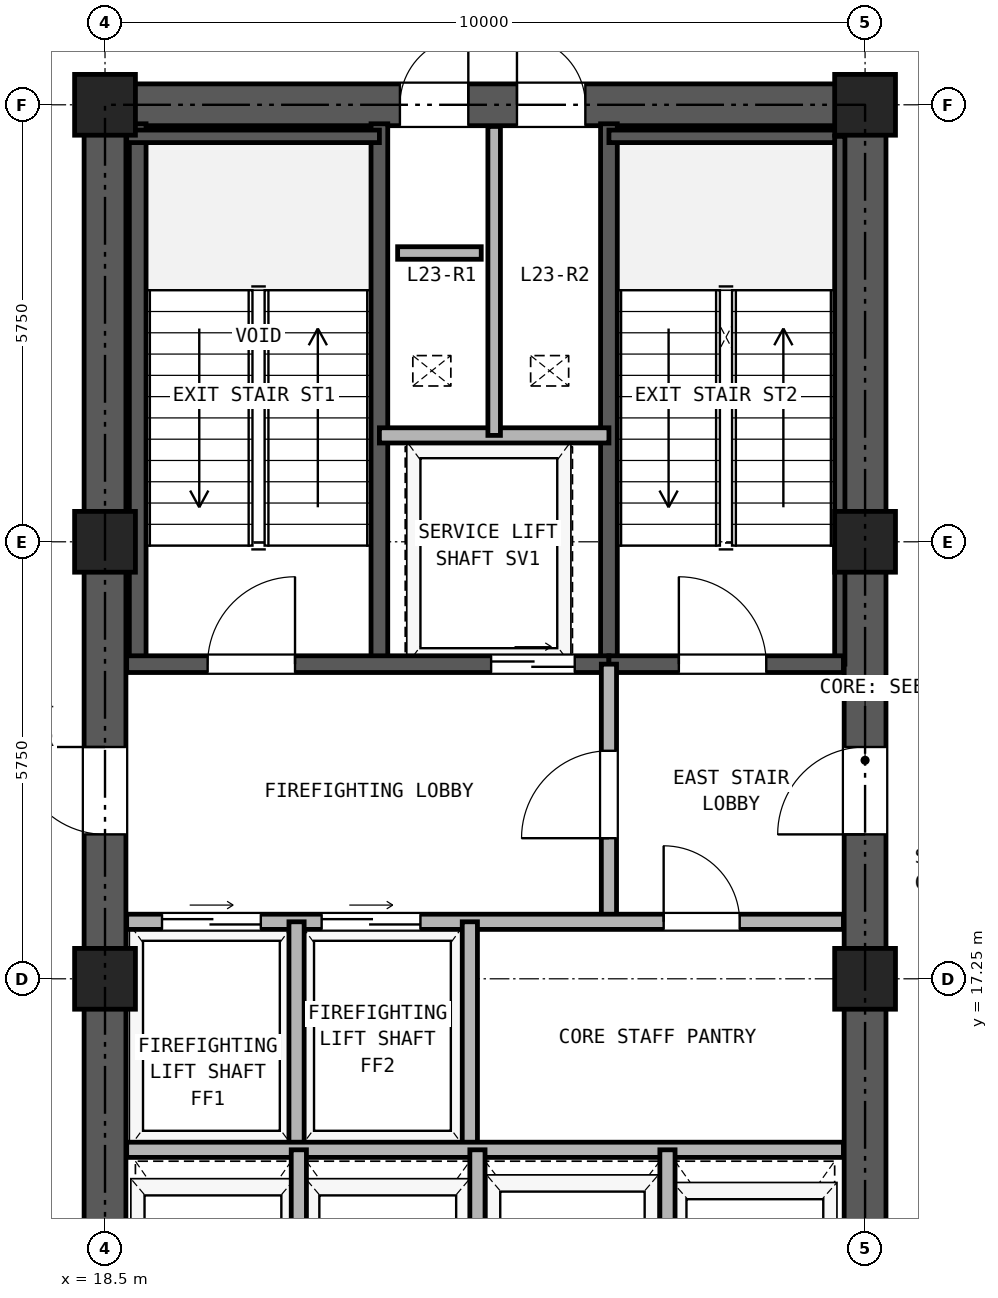
"""IFC4 building model, lengths in metres.
Left out: names, types, materials, properties, quantities, classifications, styles, units other than length and angle.
Written with IfcOpenShell. Run it as: python <this file> out.ifc"""

import sys

from ifc_helpers import new_model, si_unit, direction, frame, frame_2d, origin, origin_2d, place, context, subcontext, project, spatial, rectangle, hollow_rectangle, extrude, source, transform, mapped, element, fill, save


model = new_model("IFC4")
c1 = context("Model", 3, precision=1e-05, world=origin(), true_north=direction((0.0, 1.0)))
c2 = subcontext(c1, "Body", "Model", "MODEL_VIEW")
j1 = project(units=[si_unit("LENGTHUNIT", "METRE"), si_unit("PLANEANGLEUNIT", "RADIAN")], contexts=[c1])
p1 = place(None, origin())
s1 = spatial("IfcSite", under=j1, at=p1, CompositionType="ELEMENT")
p2 = place(p1, origin())
s2 = spatial("IfcBuilding", under=s1, at=p2, CompositionType="ELEMENT")
p3 = place(p2, frame((0.0, 0.0, 88.2)))
s3 = spatial("IfcBuildingStorey", under=s2, at=p3, CompositionType="ELEMENT", Elevation=88.2)
m1 = source(origin(), c2, "Body", "SweptSolid", [
    extrude(hollow_rectangle(XDim=0.8, YDim=0.8, WallThickness=0.045, at=origin_2d()), origin(), (0.0, 0.0, 1.0), 4.25),
])
for number, where, z_axis, x_axis in (
    (1, (18.5, 17.25, 0.0), (0.0, 0.0, 1.0), (1.0, 0.0, 0.0)),
    (2, (18.5, 23.0, 0.0), (0.0, 0.0, 1.0), (1.0, 0.0, 0.0)),
    (3, (18.5, 28.75, 0.0), (0.0, 0.0, 1.0), (1.0, 0.0, 0.0)),
    (4, (28.5, 17.25, 0.0), (0.0, 0.0, 1.0), (1.0, 0.0, 0.0)),
    (5, (28.5, 23.0, 0.0), (0.0, 0.0, 1.0), (1.0, 0.0, 0.0)),
    (6, (28.5, 28.75, 0.0), (0.0, 0.0, 1.0), (1.0, 0.0, 0.0)),
):
    element("IfcColumn", number, at=place(p3, frame(where, z_axis=z_axis, x_axis=x_axis)), inside=s3, PredefinedType="COLUMN", context=c2, shape_type="MappedRepresentation", body=[
        mapped(m1, transform((0.0, 0.0, 0.0), x_axis=(1.0, 0.0, 0.0), y_axis=(0.0, 1.0, 0.0), z_axis=(0.0, 0.0, 1.0), scale=1.0)),
    ])
p4 = place(p3, frame((18.225, 28.75, 0.0), z_axis=(0.0, 0.0, 1.0), x_axis=(1.0, 0.0, 0.0)))
e7 = element("IfcWall", 7, at=p4, inside=s3, PredefinedType="SHEAR", context=c2, shape_type="SweptSolid", body=[
    extrude(rectangle(XDim=10.55, YDim=0.55, at=frame_2d((5.275, 0.0))), origin(), (0.0, 0.0, 1.0), 4.25),
])
p5 = place(p4, frame((4.155, 0.0, 0.0)))
e8 = element("IfcOpeningElement", 8, at=p5, cuts=e7, PredefinedType="OPENING", context=c2, shape_type="SweptSolid", body=[
    extrude(rectangle(XDim=0.9, YDim=2.05, at=frame_2d((0.45, 1.025))), frame((0.0, 0.285, 0.0), z_axis=(0.0, -1.0, 0.0), x_axis=(1.0, 0.0, 0.0)), (0.0, 0.0, 1.0), 0.57),
])
p6 = place(p4, frame((5.695, 0.0, 0.0)))
e9 = element("IfcOpeningElement", 9, at=p6, cuts=e7, PredefinedType="OPENING", context=c2, shape_type="SweptSolid", body=[
    extrude(rectangle(XDim=0.9, YDim=2.05, at=frame_2d((0.45, 1.025))), frame((0.0, 0.285, 0.0), z_axis=(0.0, -1.0, 0.0), x_axis=(1.0, 0.0, 0.0)), (0.0, 0.0, 1.0), 0.57),
])
p7 = place(p3, frame((18.5, 11.775, 0.0), z_axis=(0.0, 0.0, 1.0), x_axis=(0.0, 1.0, 0.0)))
e10 = element("IfcWall", 10, at=p7, inside=s3, PredefinedType="SHEAR", context=c2, shape_type="SweptSolid", body=[
    extrude(rectangle(XDim=16.7, YDim=0.55, at=frame_2d((8.35, 0.0))), origin(), (0.0, 0.0, 1.0), 4.25),
])
p8 = place(p7, frame((7.375, 0.0, 0.0)))
e11 = element("IfcOpeningElement", 11, at=p8, cuts=e10, PredefinedType="OPENING", context=c2, shape_type="SweptSolid", body=[
    extrude(rectangle(XDim=1.15, YDim=2.2, at=frame_2d((0.575, 1.1))), frame((0.0, 0.285, 0.0), z_axis=(0.0, -1.0, 0.0), x_axis=(1.0, 0.0, 0.0)), (0.0, 0.0, 1.0), 0.57),
])
p9 = place(p3, frame((28.5, 11.775, 0.0), z_axis=(0.0, 0.0, 1.0), x_axis=(0.0, 1.0, 0.0)))
e12 = element("IfcWall", 12, at=p9, inside=s3, PredefinedType="SHEAR", context=c2, shape_type="SweptSolid", body=[
    extrude(rectangle(XDim=16.7, YDim=0.55, at=frame_2d((8.35, 0.0))), origin(), (0.0, 0.0, 1.0), 4.25),
])
p10 = place(p9, frame((7.375, 0.0, 0.0)))
e13 = element("IfcOpeningElement", 13, at=p10, cuts=e12, PredefinedType="OPENING", context=c2, shape_type="SweptSolid", body=[
    extrude(rectangle(XDim=1.15, YDim=2.2, at=frame_2d((0.575, 1.1))), frame((0.0, 0.285, 0.0), z_axis=(0.0, -1.0, 0.0), x_axis=(1.0, 0.0, 0.0)), (0.0, 0.0, 1.0), 0.57),
])
for number, where, z_axis, x_axis in (
    (14, (18.93, 21.39, 0.0), (0.0, 0.0, 1.0), (0.0, 1.0, 0.0)),
    (15, (22.11, 21.39, 0.0), (0.0, 0.0, 1.0), (0.0, 1.0, 0.0)),
    (16, (25.13, 21.39, 0.0), (0.0, 0.0, 1.0), (0.0, 1.0, 0.0)),
):
    element("IfcWall", number, at=place(p3, frame(where, z_axis=z_axis, x_axis=x_axis)), inside=s3, PredefinedType="SOLIDWALL", context=c2, shape_type="SweptSolid", body=[
        extrude(rectangle(XDim=7.11, YDim=0.22, at=frame_2d((3.555, 0.0))), origin(), (0.0, 0.0, 1.0), 4.25),
    ])
p11 = place(p3, frame((18.785, 28.335, 0.0), z_axis=(0.0, 0.0, 1.0), x_axis=(1.0, 0.0, 0.0)))
e17 = element("IfcWall", 17, at=p11, inside=s3, PredefinedType="PARTITIONING", context=c2, shape_type="SweptSolid", body=[
    extrude(rectangle(XDim=3.325, YDim=0.165, at=frame_2d((1.663, 0.0))), origin(), (0.0, 0.0, 1.0), 4.25),
])
p12 = place(p3, frame((25.13, 28.335, 0.0), z_axis=(0.0, 0.0, 1.0), x_axis=(1.0, 0.0, 0.0)))
e18 = element("IfcWall", 18, at=p12, inside=s3, PredefinedType="PARTITIONING", context=c2, shape_type="SweptSolid", body=[
    extrude(rectangle(XDim=3.085, YDim=0.165, at=frame_2d((1.542, 0.0))), origin(), (0.0, 0.0, 1.0), 4.25),
])
p13 = place(p3, frame((28.167, 21.39, 0.0), z_axis=(0.0, 0.0, 1.0), x_axis=(0.0, 1.0, 0.0)))
e19 = element("IfcWall", 19, at=p13, inside=s3, PredefinedType="PARTITIONING", context=c2, shape_type="SweptSolid", body=[
    extrude(rectangle(XDim=6.945, YDim=0.135, at=frame_2d((3.473, 0.0))), origin(), (0.0, 0.0, 1.0), 4.25),
])
p14 = place(p3, frame((18.785, 21.39, 0.0), z_axis=(0.0, 0.0, 1.0), x_axis=(1.0, 0.0, 0.0)))
e20 = element("IfcWall", 20, at=p14, inside=s3, PredefinedType="SOLIDWALL", context=c2, shape_type="SweptSolid", body=[
    extrude(rectangle(XDim=6.345, YDim=0.22, at=frame_2d((3.172, 0.0))), origin(), (0.0, 0.0, 1.0), 4.25),
])
p15 = place(p14, frame((1.065, 0.0, 0.0)))
e21 = element("IfcOpeningElement", 21, at=p15, cuts=e20, PredefinedType="OPENING", context=c2, shape_type="SweptSolid", body=[
    extrude(rectangle(XDim=1.15, YDim=2.2, at=frame_2d((0.575, 1.1))), frame((0.0, 0.12, 0.0), z_axis=(0.0, -1.0, 0.0), x_axis=(1.0, 0.0, 0.0)), (0.0, 0.0, 1.0), 0.24),
])
p16 = place(p14, frame((4.795, 0.0, 0.0)))
e22 = element("IfcOpeningElement", 22, at=p16, cuts=e20, PredefinedType="OPENING", context=c2, shape_type="SweptSolid", body=[
    extrude(rectangle(XDim=1.1, YDim=2.25, at=frame_2d((0.55, 1.125))), frame((0.0, 0.12, 0.0), z_axis=(0.0, -1.0, 0.0), x_axis=(1.0, 0.0, 0.0)), (0.0, 0.0, 1.0), 0.24),
])
p17 = place(p3, frame((25.13, 21.39, 0.0), z_axis=(0.0, 0.0, 1.0), x_axis=(1.0, 0.0, 0.0)))
e23 = element("IfcWall", 23, at=p17, inside=s3, PredefinedType="SOLIDWALL", context=c2, shape_type="SweptSolid", body=[
    extrude(rectangle(XDim=3.085, YDim=0.22, at=frame_2d((1.542, 0.0))), origin(), (0.0, 0.0, 1.0), 4.25),
])
p18 = place(p17, frame((0.92, 0.0, 0.0)))
e24 = element("IfcOpeningElement", 24, at=p18, cuts=e23, PredefinedType="OPENING", context=c2, shape_type="SweptSolid", body=[
    extrude(rectangle(XDim=1.15, YDim=2.2, at=frame_2d((0.575, 1.1))), frame((0.0, 0.12, 0.0), z_axis=(0.0, -1.0, 0.0), x_axis=(1.0, 0.0, 0.0)), (0.0, 0.0, 1.0), 0.24),
])
p19 = place(p3, frame((22.11, 24.4, 0.0), z_axis=(0.0, 0.0, 1.0), x_axis=(1.0, 0.0, 0.0)))
e25 = element("IfcWall", 25, at=p19, inside=s3, PredefinedType="PARTITIONING", context=c2, shape_type="SweptSolid", body=[
    extrude(rectangle(XDim=3.02, YDim=0.2, at=frame_2d((1.51, 0.0))), origin(), (0.0, 0.0, 1.0), 4.25),
])
p20 = place(p3, frame((23.62, 24.4, 0.0), z_axis=(0.0, 0.0, 1.0), x_axis=(0.0, 1.0, 0.0)))
e26 = element("IfcWall", 26, at=p20, inside=s3, PredefinedType="PARTITIONING", context=c2, shape_type="SweptSolid", body=[
    extrude(rectangle(XDim=4.065, YDim=0.165, at=frame_2d((2.033, 0.0))), origin(), (0.0, 0.0, 1.0), 4.25),
])
p21 = place(p3, frame((25.13, 18.0, 0.0), z_axis=(0.0, 0.0, 1.0), x_axis=(0.0, 1.0, 0.0)))
e27 = element("IfcWall", 27, at=p21, inside=s3, PredefinedType="PARTITIONING", context=c2, shape_type="SweptSolid", body=[
    extrude(rectangle(XDim=3.39, YDim=0.2, at=frame_2d((1.695, 0.0))), origin(), (0.0, 0.0, 1.0), 4.25),
])
p22 = place(p21, frame((1.1, 0.0, 0.0)))
e28 = element("IfcOpeningElement", 28, at=p22, cuts=e27, PredefinedType="OPENING", context=c2, shape_type="SweptSolid", body=[
    extrude(rectangle(XDim=1.15, YDim=2.2, at=frame_2d((0.575, 1.1))), frame((0.0, 0.11, 0.0), z_axis=(0.0, -1.0, 0.0), x_axis=(1.0, 0.0, 0.0)), (0.0, 0.0, 1.0), 0.22),
])
p23 = place(p3, frame((18.785, 18.0, 0.0), z_axis=(0.0, 0.0, 1.0), x_axis=(1.0, 0.0, 0.0)))
e29 = element("IfcWall", 29, at=p23, inside=s3, PredefinedType="PARTITIONING", context=c2, shape_type="SweptSolid", body=[
    extrude(rectangle(XDim=9.43, YDim=0.2, at=frame_2d((4.715, 0.0))), origin(), (0.0, 0.0, 1.0), 4.25),
])
p24 = place(p23, frame((0.465, 0.0, 0.0)))
e30 = element("IfcOpeningElement", 30, at=p24, cuts=e29, PredefinedType="OPENING", context=c2, shape_type="SweptSolid", body=[
    extrude(rectangle(XDim=1.3, YDim=2.3, at=frame_2d((0.65, 1.15))), frame((0.0, 0.11, 0.0), z_axis=(0.0, -1.0, 0.0), x_axis=(1.0, 0.0, 0.0)), (0.0, 0.0, 1.0), 0.22),
])
p25 = place(p23, frame((2.565, 0.0, 0.0)))
e31 = element("IfcOpeningElement", 31, at=p25, cuts=e29, PredefinedType="OPENING", context=c2, shape_type="SweptSolid", body=[
    extrude(rectangle(XDim=1.3, YDim=2.3, at=frame_2d((0.65, 1.15))), frame((0.0, 0.11, 0.0), z_axis=(0.0, -1.0, 0.0), x_axis=(1.0, 0.0, 0.0)), (0.0, 0.0, 1.0), 0.22),
])
p26 = place(p23, frame((7.065, 0.0, 0.0)))
e32 = element("IfcOpeningElement", 32, at=p26, cuts=e29, PredefinedType="OPENING", context=c2, shape_type="SweptSolid", body=[
    extrude(rectangle(XDim=1.0, YDim=2.15, at=frame_2d((0.5, 1.075))), frame((0.0, 0.11, 0.0), z_axis=(0.0, -1.0, 0.0), x_axis=(1.0, 0.0, 0.0)), (0.0, 0.0, 1.0), 0.22),
])
for number, where, z_axis, x_axis in (
    (33, (21.02, 15.0, 0.0), (0.0, 0.0, 1.0), (0.0, 1.0, 0.0)),
    (34, (23.3, 15.0, 0.0), (0.0, 0.0, 1.0), (0.0, 1.0, 0.0)),
):
    element("IfcWall", number, at=place(p3, frame(where, z_axis=z_axis, x_axis=x_axis)), inside=s3, PredefinedType="PARTITIONING", context=c2, shape_type="SweptSolid", body=[
        extrude(rectangle(XDim=3.0, YDim=0.2, at=frame_2d((1.5, 0.0))), origin(), (0.0, 0.0, 1.0), 4.25),
    ])
p27 = place(p3, frame((18.785, 15.0, 0.0), z_axis=(0.0, 0.0, 1.0), x_axis=(1.0, 0.0, 0.0)))
e35 = element("IfcWall", 35, at=p27, inside=s3, PredefinedType="PARTITIONING", context=c2, shape_type="SweptSolid", body=[
    extrude(rectangle(XDim=9.43, YDim=0.2, at=frame_2d((4.715, 0.0))), origin(), (0.0, 0.0, 1.0), 4.25),
])
for number, where, z_axis, x_axis in (
    (36, (21.05, 11.785, 0.0), (0.0, 0.0, 1.0), (0.0, 1.0, 0.0)),
    (37, (23.4, 11.785, 0.0), (0.0, 0.0, 1.0), (0.0, 1.0, 0.0)),
    (38, (25.9, 11.785, 0.0), (0.0, 0.0, 1.0), (0.0, 1.0, 0.0)),
):
    element("IfcWall", number, at=place(p3, frame(where, z_axis=z_axis, x_axis=x_axis)), inside=s3, PredefinedType="PARTITIONING", context=c2, shape_type="SweptSolid", body=[
        extrude(rectangle(XDim=3.215, YDim=0.2, at=frame_2d((1.607, 0.0))), origin(), (0.0, 0.0, 1.0), 4.25),
    ])
p28 = place(p3, frame((22.35, 26.8, 0.0), z_axis=(0.0, 0.0, 1.0), x_axis=(1.0, 0.0, 0.0)))
e39 = element("IfcWall", 39, at=p28, inside=s3, PredefinedType="PARTITIONING", context=c2, shape_type="SweptSolid", body=[
    extrude(rectangle(XDim=1.1, YDim=0.165, at=frame_2d((0.55, 0.0))), origin(), (0.0, 0.0, 1.0), 4.25),
])
p29 = place(p15, frame((1.15, 0.0, 0.0), z_axis=(0.0, 0.0, 1.0), x_axis=(-1.0, 0.0, 0.0)))
e40 = element("IfcDoor", 40, at=p29, inside=s3, OperationType="SINGLE_SWING_RIGHT", PredefinedType="DOOR", context=c2, shape_type="SweptSolid", body=[
    extrude(rectangle(XDim=1.15, YDim=2.2, at=frame_2d((0.575, 1.1))), frame((0.0, 0.025, 0.0), z_axis=(0.0, -1.0, 0.0), x_axis=(1.0, 0.0, 0.0)), (0.0, 0.0, 1.0), 0.05),
])
fill(e21, e40)
p30 = place(p18, frame((1.15, 0.0, 0.0), z_axis=(0.0, 0.0, 1.0), x_axis=(-1.0, 0.0, 0.0)))
e41 = element("IfcDoor", 41, at=p30, inside=s3, OperationType="SINGLE_SWING_LEFT", PredefinedType="DOOR", context=c2, shape_type="SweptSolid", body=[
    extrude(rectangle(XDim=1.15, YDim=2.2, at=frame_2d((0.575, 1.1))), frame((0.0, 0.025, 0.0), z_axis=(0.0, -1.0, 0.0), x_axis=(1.0, 0.0, 0.0)), (0.0, 0.0, 1.0), 0.05),
])
fill(e24, e41)
p31 = place(p16, frame((1.1, 0.0, 0.0), z_axis=(0.0, 0.0, 1.0), x_axis=(-1.0, 0.0, 0.0)))
e42 = element("IfcDoor", 42, at=p31, inside=s3, OperationType="DOUBLE_DOOR_SLIDING", PredefinedType="DOOR", context=c2, shape_type="SweptSolid", body=[
    extrude(rectangle(XDim=1.1, YDim=2.25, at=frame_2d((0.55, 1.125))), frame((0.0, 0.025, 0.0), z_axis=(0.0, -1.0, 0.0), x_axis=(1.0, 0.0, 0.0)), (0.0, 0.0, 1.0), 0.05),
])
fill(e22, e42)
p32 = place(p22, origin())
e43 = element("IfcDoor", 43, at=p32, inside=s3, OperationType="SINGLE_SWING_LEFT", PredefinedType="DOOR", context=c2, shape_type="SweptSolid", body=[
    extrude(rectangle(XDim=1.15, YDim=2.2, at=frame_2d((0.575, 1.1))), frame((0.0, 0.025, 0.0), z_axis=(0.0, -1.0, 0.0), x_axis=(1.0, 0.0, 0.0)), (0.0, 0.0, 1.0), 0.05),
])
fill(e28, e43)
p33 = place(p24, origin())
e44 = element("IfcDoor", 44, at=p33, inside=s3, OperationType="DOUBLE_DOOR_SLIDING", PredefinedType="DOOR", context=c2, shape_type="SweptSolid", body=[
    extrude(rectangle(XDim=1.3, YDim=2.3, at=frame_2d((0.65, 1.15))), frame((0.0, 0.025, 0.0), z_axis=(0.0, -1.0, 0.0), x_axis=(1.0, 0.0, 0.0)), (0.0, 0.0, 1.0), 0.05),
])
fill(e30, e44)
p34 = place(p25, origin())
e45 = element("IfcDoor", 45, at=p34, inside=s3, OperationType="DOUBLE_DOOR_SLIDING", PredefinedType="DOOR", context=c2, shape_type="SweptSolid", body=[
    extrude(rectangle(XDim=1.3, YDim=2.3, at=frame_2d((0.65, 1.15))), frame((0.0, 0.025, 0.0), z_axis=(0.0, -1.0, 0.0), x_axis=(1.0, 0.0, 0.0)), (0.0, 0.0, 1.0), 0.05),
])
fill(e31, e45)
p35 = place(p26, frame((1.0, 0.0, 0.0), z_axis=(0.0, 0.0, 1.0), x_axis=(-1.0, 0.0, 0.0)))
e46 = element("IfcDoor", 46, at=p35, inside=s3, OperationType="SINGLE_SWING_LEFT", PredefinedType="DOOR", context=c2, shape_type="SweptSolid", body=[
    extrude(rectangle(XDim=1.0, YDim=2.15, at=frame_2d((0.5, 1.075))), frame((0.0, 0.025, 0.0), z_axis=(0.0, -1.0, 0.0), x_axis=(1.0, 0.0, 0.0)), (0.0, 0.0, 1.0), 0.05),
])
fill(e32, e46)
p36 = place(p8, frame((1.15, 0.0, 0.0), z_axis=(0.0, 0.0, 1.0), x_axis=(-1.0, 0.0, 0.0)))
e47 = element("IfcDoor", 47, at=p36, inside=s3, OperationType="SINGLE_SWING_RIGHT", PredefinedType="DOOR", context=c2, shape_type="SweptSolid", body=[
    extrude(rectangle(XDim=1.15, YDim=2.2, at=frame_2d((0.575, 1.1))), frame((0.0, 0.025, 0.0), z_axis=(0.0, -1.0, 0.0), x_axis=(1.0, 0.0, 0.0)), (0.0, 0.0, 1.0), 0.05),
])
fill(e11, e47)
p37 = place(p10, origin())
e48 = element("IfcDoor", 48, at=p37, inside=s3, OperationType="SINGLE_SWING_LEFT", PredefinedType="DOOR", context=c2, shape_type="SweptSolid", body=[
    extrude(rectangle(XDim=1.15, YDim=2.2, at=frame_2d((0.575, 1.1))), frame((0.0, 0.025, 0.0), z_axis=(0.0, -1.0, 0.0), x_axis=(1.0, 0.0, 0.0)), (0.0, 0.0, 1.0), 0.05),
])
fill(e13, e48)
p38 = place(p5, origin())
e49 = element("IfcDoor", 49, at=p38, inside=s3, OperationType="SINGLE_SWING_RIGHT", PredefinedType="DOOR", context=c2, shape_type="SweptSolid", body=[
    extrude(rectangle(XDim=0.9, YDim=2.05, at=frame_2d((0.45, 1.025))), frame((0.0, 0.025, 0.0), z_axis=(0.0, -1.0, 0.0), x_axis=(1.0, 0.0, 0.0)), (0.0, 0.0, 1.0), 0.05),
])
fill(e8, e49)
p39 = place(p6, origin())
e50 = element("IfcDoor", 50, at=p39, inside=s3, OperationType="SINGLE_SWING_LEFT", PredefinedType="DOOR", context=c2, shape_type="SweptSolid", body=[
    extrude(rectangle(XDim=0.9, YDim=2.05, at=frame_2d((0.45, 1.025))), frame((0.0, 0.025, 0.0), z_axis=(0.0, -1.0, 0.0), x_axis=(1.0, 0.0, 0.0)), (0.0, 0.0, 1.0), 0.05),
])
fill(e9, e50)
save(model, sys.argv[1])
